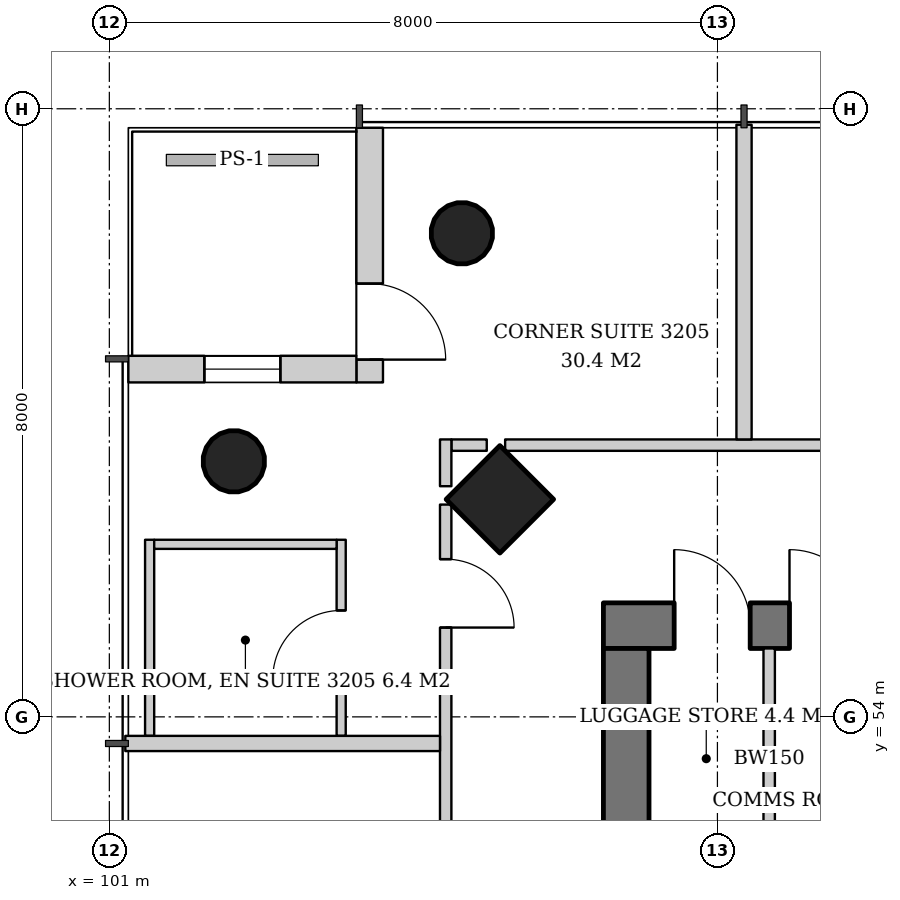
"""IFC4 building model, lengths in metres.
Left out: names, types, materials, properties, quantities, classifications, styles, units other than length and angle.
Written with IfcOpenShell. Run it as: python <this file> out.ifc"""

import sys

from ifc_helpers import new_model, si_unit, direction, frame, frame_2d, origin, origin_2d, place, context, subcontext, project, spatial, rectangle, hollow_circle, extrude, element, fill, save


model = new_model("IFC4")
c1 = context("Model", 3, precision=1e-05, world=origin(), true_north=direction((0.0, 1.0)))
c2 = subcontext(c1, "Body", "Model", "MODEL_VIEW")
j1 = project(units=[si_unit("LENGTHUNIT", "METRE"), si_unit("PLANEANGLEUNIT", "RADIAN")], contexts=[c1])
p1 = place(None, origin())
s1 = spatial("IfcSite", under=j1, at=p1, CompositionType="ELEMENT")
p2 = place(p1, origin())
s2 = spatial("IfcBuilding", under=s1, at=p2, CompositionType="ELEMENT")
p3 = place(p2, frame((0.0, 0.0, 127.4)))
s3 = spatial("IfcBuildingStorey", under=s2, at=p3, CompositionType="ELEMENT", Elevation=127.4)
p4 = place(p3, frame((106.086, 56.914, 0.0), z_axis=(0.043029647111, -0.043029647111, 0.998146732169), x_axis=(0.707106781187, 0.707106781187, 0.0)))
e1 = element("IfcColumn", 1, at=p4, inside=s3, PredefinedType="COLUMN", context=c2, shape_type="SweptSolid", body=[
    extrude(rectangle(XDim=1.0, YDim=1.0, at=origin_2d()), origin(), (0.0, 0.0, 1.0), 3.807),
])
for number, where, z_axis, x_axis in (
    (2, (105.586, 60.414, 0.0), (0.043, -0.043, 0.998), (0.707, 0.707, 0.0)),
    (3, (102.586, 57.414, 0.0), (0.043, -0.043, 0.998), (0.707, 0.707, 0.0)),
):
    element("IfcColumn", number, at=place(p3, frame(where, z_axis=z_axis, x_axis=x_axis)), inside=s3, PredefinedType="COLUMN", context=c2, shape_type="SweptSolid", body=[
        extrude(hollow_circle(Radius=0.406, WallThickness=0.03, at=origin_2d()), origin(), (0.0, 0.0, 1.0), 3.807),
    ])
p5 = place(p3, frame((107.5, 55.2, 0.0), z_axis=(0.0, 0.0, 1.0), x_axis=(1.0, 0.0, 0.0)))
e4 = element("IfcWall", 4, at=p5, inside=s3, PredefinedType="SHEAR", context=c2, shape_type="SweptSolid", body=[
    extrude(rectangle(XDim=19.0, YDim=0.6, at=frame_2d((9.5, 0.0))), origin(), (0.0, 0.0, 1.0), 3.8),
])
p6 = place(p5, frame((14.14, 0.0, 0.0)))
e5 = element("IfcOpeningElement", 5, at=p6, cuts=e4, PredefinedType="OPENING", context=c2, shape_type="SweptSolid", body=[
    extrude(rectangle(XDim=1.0, YDim=2.1, at=frame_2d((0.5, 1.05))), frame((0.0, 0.31, 0.0), z_axis=(0.0, -1.0, 0.0), x_axis=(1.0, 0.0, 0.0)), (0.0, 0.0, 1.0), 0.62),
])
p7 = place(p5, frame((0.931, 0.0, 0.0)))
e6 = element("IfcOpeningElement", 6, at=p7, cuts=e4, PredefinedType="OPENING", context=c2, shape_type="SweptSolid", body=[
    extrude(rectangle(XDim=1.0, YDim=2.1, at=frame_2d((0.5, 1.05))), frame((0.0, 0.31, 0.0), z_axis=(0.0, -1.0, 0.0), x_axis=(1.0, 0.0, 0.0)), (0.0, 0.0, 1.0), 0.62),
])
p8 = place(p5, frame((2.448, 0.0, 0.0)))
e7 = element("IfcOpeningElement", 7, at=p8, cuts=e4, PredefinedType="OPENING", context=c2, shape_type="SweptSolid", body=[
    extrude(rectangle(XDim=1.0, YDim=2.1, at=frame_2d((0.5, 1.05))), frame((0.0, 0.31, 0.0), z_axis=(0.0, -1.0, 0.0), x_axis=(1.0, 0.0, 0.0)), (0.0, 0.0, 1.0), 0.62),
])
p9 = place(p5, frame((3.983, 0.0, 0.0)))
e8 = element("IfcOpeningElement", 8, at=p9, cuts=e4, PredefinedType="OPENING", context=c2, shape_type="SweptSolid", body=[
    extrude(rectangle(XDim=1.0, YDim=2.1, at=frame_2d((0.5, 1.05))), frame((0.0, 0.31, 0.0), z_axis=(0.0, -1.0, 0.0), x_axis=(1.0, 0.0, 0.0)), (0.0, 0.0, 1.0), 0.62),
])
p10 = place(p3, frame((107.8, 37.1, 0.0), z_axis=(0.0, 0.0, 1.0), x_axis=(0.0, 1.0, 0.0)))
e9 = element("IfcWall", 9, at=p10, inside=s3, PredefinedType="SHEAR", context=c2, shape_type="SweptSolid", body=[
    extrude(rectangle(XDim=17.8, YDim=0.6, at=frame_2d((8.9, 0.0))), origin(), (0.0, 0.0, 1.0), 3.8),
])
p11 = place(p10, frame((8.0, 0.0, 0.0)))
e10 = element("IfcOpeningElement", 10, at=p11, cuts=e9, PredefinedType="OPENING", context=c2, shape_type="SweptSolid", body=[
    extrude(rectangle(XDim=1.8, YDim=2.4, at=frame_2d((0.9, 1.2))), frame((0.0, 0.31, 0.0), z_axis=(0.0, -1.0, 0.0), x_axis=(1.0, 0.0, 0.0)), (0.0, 0.0, 1.0), 0.62),
])
p12 = place(p3, frame((104.425, 61.75, 0.0), z_axis=(0.0, 0.0, 1.0), x_axis=(0.0, -1.0, 0.0)))
e11 = element("IfcWall", 11, at=p12, inside=s3, PredefinedType="SOLIDWALL", context=c2, shape_type="SweptSolid", body=[
    extrude(rectangle(XDim=3.35, YDim=0.35, at=frame_2d((1.675, 0.0))), origin(), (0.0, 0.0, 1.0), 3.35),
])
p13 = place(p12, frame((2.05, 0.0, 0.0)))
e12 = element("IfcOpeningElement", 12, at=p13, cuts=e11, PredefinedType="OPENING", context=c2, shape_type="SweptSolid", body=[
    extrude(rectangle(XDim=1.0, YDim=2.4, at=frame_2d((0.5, 1.2))), frame((0.0, 0.185, 0.0), z_axis=(0.0, -1.0, 0.0), x_axis=(1.0, 0.0, 0.0)), (0.0, 0.0, 1.0), 0.37),
])
p14 = place(p3, frame((104.25, 58.575, 0.0), z_axis=(0.0, 0.0, 1.0), x_axis=(-1.0, 0.0, 0.0)))
e13 = element("IfcWall", 13, at=p14, inside=s3, PredefinedType="SOLIDWALL", context=c2, shape_type="SweptSolid", body=[
    extrude(rectangle(XDim=3.0, YDim=0.35, at=frame_2d((1.5, 0.0))), origin(), (0.0, 0.0, 1.0), 3.35),
])
p15 = place(p14, frame((1.0, 0.0, 0.65)))
e14 = element("IfcOpeningElement", 14, at=p15, cuts=e13, PredefinedType="OPENING", context=c2, shape_type="SweptSolid", body=[
    extrude(rectangle(XDim=1.0, YDim=2.4, at=frame_2d((0.5, 1.2))), frame((0.0, 0.185, 0.0), z_axis=(0.0, -1.0, 0.0), x_axis=(1.0, 0.0, 0.0)), (0.0, 0.0, 1.0), 0.37),
])
p16 = place(p3, frame((109.681, 52.0, 0.0), z_axis=(0.0, 0.0, 1.0), x_axis=(0.0, 1.0, 0.0)))
e15 = element("IfcWall", 15, at=p16, inside=s3, PredefinedType="SOLIDWALL", context=c2, shape_type="SweptSolid", body=[
    extrude(rectangle(XDim=2.9, YDim=0.15, at=frame_2d((1.45, 0.0))), origin(), (0.0, 0.0, 1.0), 3.35),
])
p17 = place(p3, frame((127.793, 57.575, 0.0), z_axis=(0.0, 0.0, 1.0), x_axis=(-1.0, 0.0, 0.0)))
e16 = element("IfcWall", 16, at=p17, inside=s3, PredefinedType="PARTITIONING", context=c2, shape_type="SweptSolid", body=[
    extrude(rectangle(XDim=21.586, YDim=0.15, at=frame_2d((10.793, 0.0))), origin(), (0.0, 0.0, 1.0), 2.338),
])
p18 = place(p17, frame((0.718, 0.0, 0.0)))
e17 = element("IfcOpeningElement", 17, at=p18, cuts=e16, PredefinedType="OPENING", context=c2, shape_type="SweptSolid", body=[
    extrude(rectangle(XDim=0.9, YDim=2.1, at=frame_2d((0.45, 1.05))), frame((0.0, 0.085, 0.0), z_axis=(0.0, -1.0, 0.0), x_axis=(1.0, 0.0, 0.0)), (0.0, 0.0, 1.0), 0.17),
])
p19 = place(p17, frame((5.843, 0.0, 0.0)))
e18 = element("IfcOpeningElement", 18, at=p19, cuts=e16, PredefinedType="OPENING", context=c2, shape_type="SweptSolid", body=[
    extrude(rectangle(XDim=1.0, YDim=2.1, at=frame_2d((0.5, 1.05))), frame((0.0, 0.085, 0.0), z_axis=(0.0, -1.0, 0.0), x_axis=(1.0, 0.0, 0.0)), (0.0, 0.0, 1.0), 0.17),
])
p20 = place(p3, frame((105.965, 57.575, 0.0), z_axis=(0.0, 0.0, 1.0), x_axis=(-1.0, 0.0, 0.0)))
e19 = element("IfcWall", 19, at=p20, inside=s3, PredefinedType="PARTITIONING", context=c2, shape_type="SweptSolid", body=[
    extrude(rectangle(XDim=0.465, YDim=0.15, at=frame_2d((0.233, 0.0))), origin(), (0.0, 0.0, 1.0), 3.35),
])
p21 = place(p3, frame((109.35, 57.65, 0.0), z_axis=(0.0, 0.0, 1.0), x_axis=(0.0, 1.0, 0.0)))
e20 = element("IfcWall", 20, at=p21, inside=s3, PredefinedType="PARTITIONING", context=c2, shape_type="SweptSolid", body=[
    extrude(rectangle(XDim=4.14, YDim=0.2, at=frame_2d((2.07, 0.0))), origin(), (0.0, 0.0, 1.0), 2.35),
])
p22 = place(p3, frame((104.05, 53.75, 0.0), z_axis=(0.0, 0.0, 1.0), x_axis=(0.0, 1.0, 0.0)))
e21 = element("IfcWall", 21, at=p22, inside=s3, PredefinedType="PARTITIONING", context=c2, shape_type="SweptSolid", body=[
    extrude(rectangle(XDim=2.58, YDim=0.12, at=frame_2d((1.29, 0.0))), origin(), (0.0, 0.0, 1.0), 2.338),
])
p23 = place(p22, frame((0.75, 0.0, 0.0)))
e22 = element("IfcOpeningElement", 22, at=p23, cuts=e21, PredefinedType="OPENING", context=c2, shape_type="SweptSolid", body=[
    extrude(rectangle(XDim=0.9, YDim=2.1, at=frame_2d((0.45, 1.05))), frame((0.0, 0.07, 0.0), z_axis=(0.0, -1.0, 0.0), x_axis=(1.0, 0.0, 0.0)), (0.0, 0.0, 1.0), 0.14),
])
p24 = place(p3, frame((101.53, 53.75, 0.0), z_axis=(0.0, 0.0, 1.0), x_axis=(0.0, 1.0, 0.0)))
e23 = element("IfcWall", 23, at=p24, inside=s3, PredefinedType="PARTITIONING", context=c2, shape_type="SweptSolid", body=[
    extrude(rectangle(XDim=2.58, YDim=0.12, at=frame_2d((1.29, 0.0))), origin(), (0.0, 0.0, 1.0), 3.35),
])
p25 = place(p3, frame((103.99, 56.27, 0.0), z_axis=(0.0, 0.0, 1.0), x_axis=(-1.0, 0.0, 0.0)))
e24 = element("IfcWall", 24, at=p25, inside=s3, PredefinedType="PARTITIONING", context=c2, shape_type="SweptSolid", body=[
    extrude(rectangle(XDim=2.4, YDim=0.12, at=frame_2d((1.2, 0.0))), origin(), (0.0, 0.0, 1.0), 2.35),
])
p26 = place(p3, frame((105.425, 57.65, 0.0), z_axis=(0.0, 0.0, 1.0), x_axis=(0.0, -1.0, 0.0)))
e25 = element("IfcWall", 25, at=p26, inside=s3, PredefinedType="PARTITIONING", context=c2, shape_type="SweptSolid", body=[
    extrude(rectangle(XDim=0.615, YDim=0.15, at=frame_2d((0.308, 0.0))), origin(), (0.0, 0.0, 1.0), 3.35),
])
p27 = place(p3, frame((105.425, 56.793, 0.0), z_axis=(0.0, 0.0, 1.0), x_axis=(0.0, -1.0, 0.0)))
e26 = element("IfcWall", 26, at=p27, inside=s3, PredefinedType="PARTITIONING", context=c2, shape_type="SweptSolid", body=[
    extrude(rectangle(XDim=21.586, YDim=0.15, at=frame_2d((10.793, 0.0))), origin(), (0.0, 0.0, 1.0), 2.338),
])
p28 = place(p27, frame((0.718, 0.0, 0.0)))
e27 = element("IfcOpeningElement", 27, at=p28, cuts=e26, PredefinedType="OPENING", context=c2, shape_type="SweptSolid", body=[
    extrude(rectangle(XDim=0.9, YDim=2.1, at=frame_2d((0.45, 1.05))), frame((0.0, 0.085, 0.0), z_axis=(0.0, -1.0, 0.0), x_axis=(1.0, 0.0, 0.0)), (0.0, 0.0, 1.0), 0.17),
])
p29 = place(p27, frame((5.843, 0.0, 0.0)))
e28 = element("IfcOpeningElement", 28, at=p29, cuts=e26, PredefinedType="OPENING", context=c2, shape_type="SweptSolid", body=[
    extrude(rectangle(XDim=1.0, YDim=2.1, at=frame_2d((0.5, 1.05))), frame((0.0, 0.085, 0.0), z_axis=(0.0, -1.0, 0.0), x_axis=(1.0, 0.0, 0.0)), (0.0, 0.0, 1.0), 0.17),
])
p30 = place(p27, frame((10.993, 0.0, 0.0)))
e29 = element("IfcOpeningElement", 29, at=p30, cuts=e26, PredefinedType="OPENING", context=c2, shape_type="SweptSolid", body=[
    extrude(rectangle(XDim=0.9, YDim=2.1, at=frame_2d((0.45, 1.05))), frame((0.0, 0.085, 0.0), z_axis=(0.0, -1.0, 0.0), x_axis=(1.0, 0.0, 0.0)), (0.0, 0.0, 1.0), 0.17),
])
p31 = place(p3, frame((105.35, 53.65, 0.0), z_axis=(0.0, 0.0, 1.0), x_axis=(-1.0, 0.0, 0.0)))
e30 = element("IfcWall", 30, at=p31, inside=s3, PredefinedType="PARTITIONING", context=c2, shape_type="SweptSolid", body=[
    extrude(rectangle(XDim=4.14, YDim=0.2, at=frame_2d((2.07, 0.0))), origin(), (0.0, 0.0, 1.0), 2.35),
])
p32 = place(p13, origin())
e31 = element("IfcDoor", 31, at=p32, inside=s3, OperationType="SINGLE_SWING_RIGHT", PredefinedType="DOOR", context=c2, shape_type="SweptSolid", body=[
    extrude(rectangle(XDim=1.0, YDim=2.4, at=frame_2d((0.5, 1.2))), frame((0.0, 0.025, 0.0), z_axis=(0.0, -1.0, 0.0), x_axis=(1.0, 0.0, 0.0)), (0.0, 0.0, 1.0), 0.05),
])
fill(e12, e31)
p33 = place(p15, origin())
e32 = element("IfcWindow", 32, at=p33, inside=s3, PartitioningType="SINGLE_PANEL", PredefinedType="WINDOW", context=c2, shape_type="SweptSolid", body=[
    extrude(rectangle(XDim=1.0, YDim=2.4, at=frame_2d((0.5, 1.2))), frame((0.0, 0.03, 0.0), z_axis=(0.0, -1.0, 0.0), x_axis=(1.0, 0.0, 0.0)), (0.0, 0.0, 1.0), 0.06),
])
fill(e14, e32)
p34 = place(p7, origin())
e33 = element("IfcDoor", 33, at=p34, inside=s3, OperationType="SINGLE_SWING_LEFT", PredefinedType="DOOR", context=c2, shape_type="SweptSolid", body=[
    extrude(rectangle(XDim=1.0, YDim=2.1, at=frame_2d((0.5, 1.05))), frame((0.0, -0.24, 0.0), z_axis=(0.0, -1.0, 0.0), x_axis=(1.0, 0.0, 0.0)), (0.0, 0.0, 1.0), 0.05),
])
fill(e6, e33)
p35 = place(p8, origin())
e34 = element("IfcDoor", 34, at=p35, inside=s3, OperationType="SINGLE_SWING_LEFT", PredefinedType="DOOR", context=c2, shape_type="SweptSolid", body=[
    extrude(rectangle(XDim=1.0, YDim=2.1, at=frame_2d((0.5, 1.05))), frame((0.0, -0.24, 0.0), z_axis=(0.0, -1.0, 0.0), x_axis=(1.0, 0.0, 0.0)), (0.0, 0.0, 1.0), 0.05),
])
fill(e7, e34)
p36 = place(p23, origin())
e35 = element("IfcDoor", 35, at=p36, inside=s3, OperationType="SINGLE_SWING_LEFT", PredefinedType="DOOR", context=c2, shape_type="SweptSolid", body=[
    extrude(rectangle(XDim=0.9, YDim=2.1, at=frame_2d((0.45, 1.05))), frame((0.0, 0.025, 0.0), z_axis=(0.0, -1.0, 0.0), x_axis=(1.0, 0.0, 0.0)), (0.0, 0.0, 1.0), 0.05),
])
fill(e22, e35)
p37 = place(p28, origin())
e36 = element("IfcDoor", 36, at=p37, inside=s3, OperationType="SINGLE_SWING_RIGHT", PredefinedType="DOOR", context=c2, shape_type="SweptSolid", body=[
    extrude(rectangle(XDim=0.9, YDim=2.1, at=frame_2d((0.45, 1.05))), frame((0.0, 0.025, 0.0), z_axis=(0.0, -1.0, 0.0), x_axis=(1.0, 0.0, 0.0)), (0.0, 0.0, 1.0), 0.05),
])
fill(e27, e36)
save(model, sys.argv[1])
